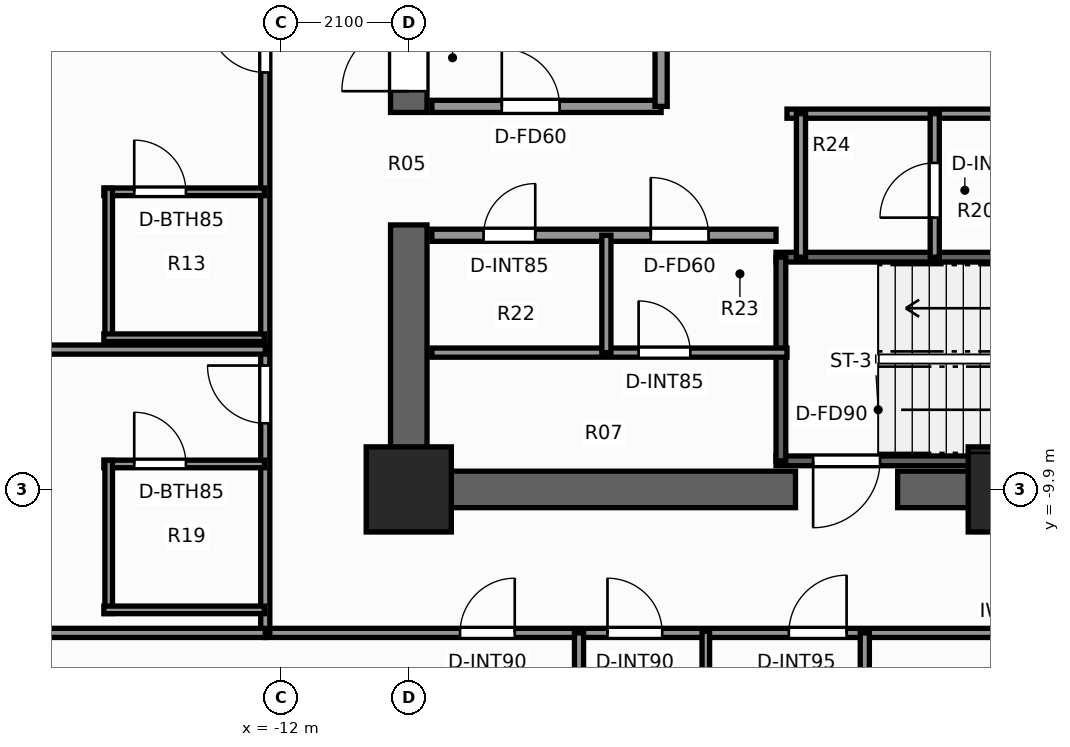
"""IFC4 building model, lengths in metres.
Left out: names, types, materials, properties, quantities, classifications, styles, units other than length and angle.
Written with IfcOpenShell. Run it as: python <this file> out.ifc"""

import sys

from ifc_helpers import new_model, si_unit, direction, frame, frame_2d, origin, origin_2d, place, context, subcontext, project, spatial, rectangle, extrude, element, fill, save


model = new_model("IFC4")
c1 = context("Model", 3, precision=1e-05, world=origin(), true_north=direction((0.0, 1.0)))
c2 = subcontext(c1, "Body", "Model", "MODEL_VIEW")
j1 = project(units=[si_unit("LENGTHUNIT", "METRE"), si_unit("PLANEANGLEUNIT", "RADIAN")], contexts=[c1])
p1 = place(None, origin())
s1 = spatial("IfcSite", under=j1, at=p1, CompositionType="ELEMENT")
p2 = place(p1, origin())
s2 = spatial("IfcBuilding", under=s1, at=p2, CompositionType="ELEMENT")
p3 = place(p2, frame((0.0, 0.0, 50.2)))
s3 = spatial("IfcBuildingStorey", under=s2, at=p3, CompositionType="ELEMENT", Elevation=50.2)
p4 = place(p3, frame((10.2, -9.9, 0.0), z_axis=(0.0, 0.0, 1.0), x_axis=(-1.0, 0.0, 0.0)))
e1 = element("IfcWall", 1, at=p4, inside=s3, PredefinedType="SHEAR", context=c2, shape_type="SweptSolid", body=[
    extrude(rectangle(XDim=12.06, YDim=0.6, at=frame_2d((6.03, 0.0))), origin(), (0.0, 0.0, 1.0), 3.3),
])
p5 = place(p3, frame((-3.54, -9.9, 0.0), z_axis=(0.0, 0.0, 1.0), x_axis=(-1.0, 0.0, 0.0)))
e2 = element("IfcWall", 2, at=p5, inside=s3, PredefinedType="SHEAR", context=c2, shape_type="SweptSolid", body=[
    extrude(rectangle(XDim=6.66, YDim=0.6, at=frame_2d((3.33, 0.0))), origin(), (0.0, 0.0, 1.0), 3.3),
])
p6 = place(p3, frame((-9.9, -9.6, 0.0), z_axis=(0.0, 0.0, 1.0), x_axis=(0.0, 1.0, 0.0)))
e3 = element("IfcWall", 3, at=p6, inside=s3, PredefinedType="SHEAR", context=c2, shape_type="SweptSolid", body=[
    extrude(rectangle(XDim=4.05, YDim=0.6, at=frame_2d((2.025, 0.0))), origin(), (0.0, 0.0, 1.0), 3.3),
])
p7 = place(p3, frame((-9.9, -3.7, 0.0), z_axis=(0.0, 0.0, 1.0), x_axis=(0.0, 1.0, 0.0)))
e4 = element("IfcWall", 4, at=p7, inside=s3, PredefinedType="SHEAR", context=c2, shape_type="SweptSolid", body=[
    extrude(rectangle(XDim=13.3, YDim=0.6, at=frame_2d((6.65, 0.0))), origin(), (0.0, 0.0, 1.0), 3.3),
])
p8 = place(p7, frame((0.35, 0.0, 0.0)))
e5 = element("IfcOpeningElement", 5, at=p8, cuts=e4, PredefinedType="OPENING", context=c2, shape_type="SweptSolid", body=[
    extrude(rectangle(XDim=1.1, YDim=2.2, at=frame_2d((0.55, 1.1))), frame((0.0, 0.31, 0.0), z_axis=(0.0, -1.0, 0.0), x_axis=(1.0, 0.0, 0.0)), (0.0, 0.0, 1.0), 0.62),
])
for number, where, z_axis, x_axis in (
    (6, (-9.9, -9.9, 0.0), (0.0, 0.0, 1.0), (1.0, 0.0, 0.0)),
    (7, (0.0, -9.9, 0.0), (0.0, 0.0, 1.0), (1.0, 0.0, 0.0)),
):
    element("IfcColumn", number, at=place(p3, frame(where, z_axis=z_axis, x_axis=x_axis)), inside=s3, PredefinedType="COLUMN", context=c2, shape_type="SweptSolid", body=[
        extrude(rectangle(XDim=1.4, YDim=1.4, at=origin_2d()), origin(), (0.0, 0.0, 1.0), 3.3),
    ])
p9 = place(p3, frame((3.86, -9.43, 0.0), z_axis=(0.0, 0.0, 1.0), x_axis=(-1.0, 0.0, 0.0)))
e8 = element("IfcWall", 8, at=p9, inside=s3, PredefinedType="SHEAR", context=c2, shape_type="SweptSolid", body=[
    extrude(rectangle(XDim=7.72, YDim=0.16, at=frame_2d((3.86, 0.0))), origin(), (0.0, 0.0, 1.0), 3.3),
])
p10 = place(p9, frame((6.01, 0.0, 0.0)))
e9 = element("IfcOpeningElement", 9, at=p10, cuts=e8, PredefinedType="OPENING", context=c2, shape_type="SweptSolid", body=[
    extrude(rectangle(XDim=1.1, YDim=2.2, at=frame_2d((0.55, 1.1))), frame((0.0, 0.09, 0.0), z_axis=(0.0, -1.0, 0.0), x_axis=(1.0, 0.0, 0.0)), (0.0, 0.0, 1.0), 0.18),
])
p11 = place(p3, frame((-3.86, -6.08, 0.0), z_axis=(0.0, 0.0, 1.0), x_axis=(1.0, 0.0, 0.0)))
e10 = element("IfcWall", 10, at=p11, inside=s3, PredefinedType="SHEAR", context=c2, shape_type="SweptSolid", body=[
    extrude(rectangle(XDim=7.72, YDim=0.16, at=frame_2d((3.86, 0.0))), origin(), (0.0, 0.0, 1.0), 3.3),
])
p12 = place(p3, frame((-3.78, -9.43, 0.0), z_axis=(0.0, 0.0, 1.0), x_axis=(0.0, 1.0, 0.0)))
e11 = element("IfcWall", 11, at=p12, inside=s3, PredefinedType="SHEAR", context=c2, shape_type="SweptSolid", body=[
    extrude(rectangle(XDim=3.35, YDim=0.16, at=frame_2d((1.675, 0.0))), origin(), (0.0, 0.0, 1.0), 3.3),
])
p13 = place(p3, frame((-9.52, -3.6, 0.0), z_axis=(0.0, 0.0, 1.0), x_axis=(1.0, 0.0, 0.0)))
e12 = element("IfcWall", 12, at=p13, inside=s3, PredefinedType="SOLIDWALL", context=c2, shape_type="SweptSolid", body=[
    extrude(rectangle(XDim=3.77, YDim=0.2, at=frame_2d((1.885, 0.0))), origin(), (0.0, 0.0, 1.0), 3.06),
])
p14 = place(p13, frame((1.15, 0.0, 0.0)))
e13 = element("IfcOpeningElement", 13, at=p14, cuts=e12, PredefinedType="OPENING", context=c2, shape_type="SweptSolid", body=[
    extrude(rectangle(XDim=0.95, YDim=2.06, at=frame_2d((0.475, 1.03))), frame((0.0, 0.11, 0.0), z_axis=(0.0, -1.0, 0.0), x_axis=(1.0, 0.0, 0.0)), (0.0, 0.0, 1.0), 0.22),
])
p15 = place(p3, frame((-5.75, -3.6, 0.0), z_axis=(0.0, 0.0, 1.0), x_axis=(0.0, 1.0, 0.0)))
e14 = element("IfcWall", 14, at=p15, inside=s3, PredefinedType="SOLIDWALL", context=c2, shape_type="SweptSolid", body=[
    extrude(rectangle(XDim=5.57, YDim=0.2, at=frame_2d((2.785, 0.0))), origin(), (0.0, 0.0, 1.0), 3.06),
])
p16 = place(p15, frame((2.75, 0.0, 0.0)))
e15 = element("IfcOpeningElement", 15, at=p16, cuts=e14, PredefinedType="OPENING", context=c2, shape_type="SweptSolid", body=[
    extrude(rectangle(XDim=1.1, YDim=2.2, at=frame_2d((0.55, 1.1))), frame((0.0, 0.11, 0.0), z_axis=(0.0, -1.0, 0.0), x_axis=(1.0, 0.0, 0.0)), (0.0, 0.0, 1.0), 0.22),
])
p17 = place(p3, frame((-9.52, -5.72, 0.0), z_axis=(0.0, 0.0, 1.0), x_axis=(1.0, 0.0, 0.0)))
e16 = element("IfcWall", 16, at=p17, inside=s3, PredefinedType="SOLIDWALL", context=c2, shape_type="SweptSolid", body=[
    extrude(rectangle(XDim=5.66, YDim=0.2, at=frame_2d((2.83, 0.0))), origin(), (0.0, 0.0, 1.0), 3.06),
])
p18 = place(p17, frame((3.6, 0.0, 0.0)))
e17 = element("IfcOpeningElement", 17, at=p18, cuts=e16, PredefinedType="OPENING", context=c2, shape_type="SweptSolid", body=[
    extrude(rectangle(XDim=0.95, YDim=2.06, at=frame_2d((0.475, 1.03))), frame((0.0, 0.11, 0.0), z_axis=(0.0, -1.0, 0.0), x_axis=(1.0, 0.0, 0.0)), (0.0, 0.0, 1.0), 0.22),
])
p19 = place(p17, frame((0.85, 0.0, 0.0)))
e18 = element("IfcOpeningElement", 18, at=p19, cuts=e16, PredefinedType="OPENING", context=c2, shape_type="SweptSolid", body=[
    extrude(rectangle(XDim=0.85, YDim=2.03, at=frame_2d((0.425, 1.015))), frame((0.0, 0.11, 0.0), z_axis=(0.0, -1.0, 0.0), x_axis=(1.0, 0.0, 0.0)), (0.0, 0.0, 1.0), 0.22),
])
p20 = place(p3, frame((-9.52, -7.65, 0.0), z_axis=(0.0, 0.0, 1.0), x_axis=(1.0, 0.0, 0.0)))
e19 = element("IfcWall", 19, at=p20, inside=s3, PredefinedType="PARTITIONING", context=c2, shape_type="SweptSolid", body=[
    extrude(rectangle(XDim=5.84, YDim=0.15, at=frame_2d((2.92, 0.0))), origin(), (0.0, 0.0, 1.0), 3.06),
])
p21 = place(p20, frame((3.4, 0.0, 0.0)))
e20 = element("IfcOpeningElement", 20, at=p21, cuts=e19, PredefinedType="OPENING", context=c2, shape_type="SweptSolid", body=[
    extrude(rectangle(XDim=0.85, YDim=2.03, at=frame_2d((0.425, 1.015))), frame((0.0, 0.085, 0.0), z_axis=(0.0, -1.0, 0.0), x_axis=(1.0, 0.0, 0.0)), (0.0, 0.0, 1.0), 0.17),
])
p22 = place(p3, frame((-6.65, -7.65, 0.0), z_axis=(0.0, 0.0, 1.0), x_axis=(0.0, 1.0, 0.0)))
e21 = element("IfcWall", 21, at=p22, inside=s3, PredefinedType="PARTITIONING", context=c2, shape_type="SweptSolid", body=[
    extrude(rectangle(XDim=1.93, YDim=0.15, at=frame_2d((0.965, 0.0))), origin(), (0.0, 0.0, 1.0), 3.06),
])
p23 = place(p3, frame((-3.68, -3.72, 0.0), z_axis=(0.0, 0.0, 1.0), x_axis=(1.0, 0.0, 0.0)))
e22 = element("IfcWall", 22, at=p23, inside=s3, PredefinedType="PARTITIONING", context=c2, shape_type="SweptSolid", body=[
    extrude(rectangle(XDim=7.36, YDim=0.15, at=frame_2d((3.68, 0.0))), origin(), (0.0, 0.0, 1.0), 3.06),
])
p24 = place(p3, frame((-3.45, -6.08, 0.0), z_axis=(0.0, 0.0, 1.0), x_axis=(0.0, 1.0, 0.0)))
e23 = element("IfcWall", 23, at=p24, inside=s3, PredefinedType="PARTITIONING", context=c2, shape_type="SweptSolid", body=[
    extrude(rectangle(XDim=2.36, YDim=0.15, at=frame_2d((1.18, 0.0))), origin(), (0.0, 0.0, 1.0), 3.06),
])
p25 = place(p3, frame((-1.25, -6.08, 0.0), z_axis=(0.0, 0.0, 1.0), x_axis=(0.0, 1.0, 0.0)))
e24 = element("IfcWall", 24, at=p25, inside=s3, PredefinedType="PARTITIONING", context=c2, shape_type="SweptSolid", body=[
    extrude(rectangle(XDim=2.36, YDim=0.15, at=frame_2d((1.18, 0.0))), origin(), (0.0, 0.0, 1.0), 3.06),
])
p26 = place(p25, frame((0.65, 0.0, 0.0)))
e25 = element("IfcOpeningElement", 25, at=p26, cuts=e24, PredefinedType="OPENING", context=c2, shape_type="SweptSolid", body=[
    extrude(rectangle(XDim=0.9, YDim=2.06, at=frame_2d((0.45, 1.03))), frame((0.0, 0.085, 0.0), z_axis=(0.0, -1.0, 0.0), x_axis=(1.0, 0.0, 0.0)), (0.0, 0.0, 1.0), 0.17),
])
p27 = place(p3, frame((-12.26, -12.26, 0.0), z_axis=(0.0, 0.0, 1.0), x_axis=(1.0, 0.0, 0.0)))
e26 = element("IfcWall", 26, at=p27, inside=s3, PredefinedType="PARTITIONING", context=c2, shape_type="SweptSolid", body=[
    extrude(rectangle(XDim=24.84, YDim=0.15, at=frame_2d((12.42, 0.0))), origin(), (0.0, 0.0, 1.0), 2.272),
])
p28 = place(p27, frame((3.203, 0.0, 0.0)))
e27 = element("IfcOpeningElement", 27, at=p28, cuts=e26, PredefinedType="OPENING", context=c2, shape_type="SweptSolid", body=[
    extrude(rectangle(XDim=0.9, YDim=2.06, at=frame_2d((0.45, 1.03))), frame((0.0, 0.085, 0.0), z_axis=(0.0, -1.0, 0.0), x_axis=(1.0, 0.0, 0.0)), (0.0, 0.0, 1.0), 0.17),
])
p29 = place(p27, frame((5.628, 0.0, 0.0)))
e28 = element("IfcOpeningElement", 28, at=p29, cuts=e26, PredefinedType="OPENING", context=c2, shape_type="SweptSolid", body=[
    extrude(rectangle(XDim=0.9, YDim=2.06, at=frame_2d((0.45, 1.03))), frame((0.0, 0.085, 0.0), z_axis=(0.0, -1.0, 0.0), x_axis=(1.0, 0.0, 0.0)), (0.0, 0.0, 1.0), 0.17),
])
p30 = place(p27, frame((8.611, 0.0, 0.0)))
e29 = element("IfcOpeningElement", 29, at=p30, cuts=e26, PredefinedType="OPENING", context=c2, shape_type="SweptSolid", body=[
    extrude(rectangle(XDim=0.95, YDim=2.06, at=frame_2d((0.475, 1.03))), frame((0.0, 0.085, 0.0), z_axis=(0.0, -1.0, 0.0), x_axis=(1.0, 0.0, 0.0)), (0.0, 0.0, 1.0), 0.17),
])
p31 = place(p27, frame((13.84, 0.0, 0.0)))
e30 = element("IfcOpeningElement", 30, at=p31, cuts=e26, PredefinedType="OPENING", context=c2, shape_type="SweptSolid", body=[
    extrude(rectangle(XDim=0.9, YDim=2.06, at=frame_2d((0.45, 1.03))), frame((0.0, 0.085, 0.0), z_axis=(0.0, -1.0, 0.0), x_axis=(1.0, 0.0, 0.0)), (0.0, 0.0, 1.0), 0.17),
])
p32 = place(p27, frame((19.542, 0.0, 0.0)))
e31 = element("IfcOpeningElement", 31, at=p32, cuts=e26, PredefinedType="OPENING", context=c2, shape_type="SweptSolid", body=[
    extrude(rectangle(XDim=0.9, YDim=2.06, at=frame_2d((0.45, 1.03))), frame((0.0, 0.085, 0.0), z_axis=(0.0, -1.0, 0.0), x_axis=(1.0, 0.0, 0.0)), (0.0, 0.0, 1.0), 0.17),
])
p33 = place(p3, frame((-12.26, -12.26, 0.0), z_axis=(0.0, 0.0, 1.0), x_axis=(0.0, 1.0, 0.0)))
e32 = element("IfcWall", 32, at=p33, inside=s3, PredefinedType="PARTITIONING", context=c2, shape_type="SweptSolid", body=[
    extrude(rectangle(XDim=24.84, YDim=0.15, at=frame_2d((12.42, 0.0))), origin(), (0.0, 0.0, 1.0), 2.272),
])
p34 = place(p33, frame((3.448, 0.0, 0.0)))
e33 = element("IfcOpeningElement", 33, at=p34, cuts=e32, PredefinedType="OPENING", context=c2, shape_type="SweptSolid", body=[
    extrude(rectangle(XDim=0.95, YDim=2.06, at=frame_2d((0.475, 1.03))), frame((0.0, 0.085, 0.0), z_axis=(0.0, -1.0, 0.0), x_axis=(1.0, 0.0, 0.0)), (0.0, 0.0, 1.0), 0.17),
])
p35 = place(p33, frame((9.218, 0.0, 0.0)))
e34 = element("IfcOpeningElement", 34, at=p35, cuts=e32, PredefinedType="OPENING", context=c2, shape_type="SweptSolid", body=[
    extrude(rectangle(XDim=0.95, YDim=2.06, at=frame_2d((0.475, 1.03))), frame((0.0, 0.085, 0.0), z_axis=(0.0, -1.0, 0.0), x_axis=(1.0, 0.0, 0.0)), (0.0, 0.0, 1.0), 0.17),
])
p36 = place(p33, frame((14.558, 0.0, 0.0)))
e35 = element("IfcOpeningElement", 35, at=p36, cuts=e32, PredefinedType="OPENING", context=c2, shape_type="SweptSolid", body=[
    extrude(rectangle(XDim=0.95, YDim=2.06, at=frame_2d((0.475, 1.03))), frame((0.0, 0.085, 0.0), z_axis=(0.0, -1.0, 0.0), x_axis=(1.0, 0.0, 0.0)), (0.0, 0.0, 1.0), 0.17),
])
p37 = place(p33, frame((20.852, 0.0, 0.0)))
e36 = element("IfcOpeningElement", 36, at=p37, cuts=e32, PredefinedType="OPENING", context=c2, shape_type="SweptSolid", body=[
    extrude(rectangle(XDim=0.95, YDim=2.06, at=frame_2d((0.475, 1.03))), frame((0.0, 0.085, 0.0), z_axis=(0.0, -1.0, 0.0), x_axis=(1.0, 0.0, 0.0)), (0.0, 0.0, 1.0), 0.17),
])
p38 = place(p3, frame((-21.98, -12.26, 0.0), z_axis=(0.0, 0.0, 1.0), x_axis=(1.0, 0.0, 0.0)))
e37 = element("IfcWall", 37, at=p38, inside=s3, PredefinedType="PARTITIONING", context=c2, shape_type="SweptSolid", body=[
    extrude(rectangle(XDim=9.72, YDim=0.15, at=frame_2d((4.86, 0.0))), origin(), (0.0, 0.0, 1.0), 2.272),
])
for number, where, z_axis, x_axis in (
    (38, (-7.1, -21.98, 0.0), (0.0, 0.0, 1.0), (0.0, 1.0, 0.0)),
    (39, (-2.4, -21.98, 0.0), (0.0, 0.0, 1.0), (0.0, 1.0, 0.0)),
):
    element("IfcWall", number, at=place(p3, frame(where, z_axis=z_axis, x_axis=x_axis)), inside=s3, PredefinedType="PARTITIONING", context=c2, shape_type="SweptSolid", body=[
        extrude(rectangle(XDim=9.72, YDim=0.15, at=frame_2d((4.86, 0.0))), origin(), (0.0, 0.0, 1.0), 2.429),
    ])
p39 = place(p3, frame((-5.015, -21.98, 0.0), z_axis=(0.0, 0.0, 1.0), x_axis=(0.0, 1.0, 0.0)))
e40 = element("IfcWall", 40, at=p39, inside=s3, PredefinedType="PARTITIONING", context=c2, shape_type="SweptSolid", body=[
    extrude(rectangle(XDim=9.745, YDim=0.125, at=frame_2d((4.873, 0.0))), origin(), (0.0, 0.0, 1.0), 2.429),
])
p40 = place(p3, frame((-21.98, -7.6, 0.0), z_axis=(0.0, 0.0, 1.0), x_axis=(1.0, 0.0, 0.0)))
e41 = element("IfcWall", 41, at=p40, inside=s3, PredefinedType="PARTITIONING", context=c2, shape_type="SweptSolid", body=[
    extrude(rectangle(XDim=9.72, YDim=0.15, at=frame_2d((4.86, 0.0))), origin(), (0.0, 0.0, 1.0), 2.429),
])
p41 = place(p3, frame((-14.915, -9.481, 0.0), z_axis=(0.0, 0.0, 1.0), x_axis=(1.0, 0.0, 0.0)))
e42 = element("IfcWall", 42, at=p41, inside=s3, PredefinedType="PARTITIONING", context=c2, shape_type="SweptSolid", body=[
    extrude(rectangle(XDim=2.64, YDim=0.125, at=frame_2d((1.32, 0.0))), origin(), (0.0, 0.0, 1.0), 3.06),
])
p42 = place(p41, frame((0.5, 0.0, 0.0)))
e43 = element("IfcOpeningElement", 43, at=p42, cuts=e42, PredefinedType="OPENING", context=c2, shape_type="SweptSolid", body=[
    extrude(rectangle(XDim=0.85, YDim=2.03, at=frame_2d((0.425, 1.015))), frame((0.0, 0.073, 0.0), z_axis=(0.0, -1.0, 0.0), x_axis=(1.0, 0.0, 0.0)), (0.0, 0.0, 1.0), 0.145),
])
p43 = place(p3, frame((-14.835, -11.941, 0.0), z_axis=(0.0, 0.0, 1.0), x_axis=(0.0, 1.0, 0.0)))
e44 = element("IfcWall", 44, at=p43, inside=s3, PredefinedType="PARTITIONING", context=c2, shape_type="SweptSolid", body=[
    extrude(rectangle(XDim=2.52, YDim=0.125, at=frame_2d((1.26, 0.0))), origin(), (0.0, 0.0, 1.0), 2.272),
])
p44 = place(p3, frame((-14.915, -11.881, 0.0), z_axis=(0.0, 0.0, 1.0), x_axis=(1.0, 0.0, 0.0)))
e45 = element("IfcWall", 45, at=p44, inside=s3, PredefinedType="PARTITIONING", context=c2, shape_type="SweptSolid", body=[
    extrude(rectangle(XDim=2.64, YDim=0.125, at=frame_2d((1.32, 0.0))), origin(), (0.0, 0.0, 1.0), 2.272),
])
p45 = place(p3, frame((-14.915, -5.005, 0.0), z_axis=(0.0, 0.0, 1.0), x_axis=(1.0, 0.0, 0.0)))
e46 = element("IfcWall", 46, at=p45, inside=s3, PredefinedType="PARTITIONING", context=c2, shape_type="SweptSolid", body=[
    extrude(rectangle(XDim=2.64, YDim=0.125, at=frame_2d((1.32, 0.0))), origin(), (0.0, 0.0, 1.0), 3.06),
])
p46 = place(p45, frame((0.5, 0.0, 0.0)))
e47 = element("IfcOpeningElement", 47, at=p46, cuts=e46, PredefinedType="OPENING", context=c2, shape_type="SweptSolid", body=[
    extrude(rectangle(XDim=0.85, YDim=2.03, at=frame_2d((0.425, 1.015))), frame((0.0, 0.073, 0.0), z_axis=(0.0, -1.0, 0.0), x_axis=(1.0, 0.0, 0.0)), (0.0, 0.0, 1.0), 0.145),
])
p47 = place(p3, frame((-14.835, -7.465, 0.0), z_axis=(0.0, 0.0, 1.0), x_axis=(0.0, 1.0, 0.0)))
e48 = element("IfcWall", 48, at=p47, inside=s3, PredefinedType="PARTITIONING", context=c2, shape_type="SweptSolid", body=[
    extrude(rectangle(XDim=2.52, YDim=0.125, at=frame_2d((1.26, 0.0))), origin(), (0.0, 0.0, 1.0), 3.06),
])
p48 = place(p3, frame((-14.915, -7.405, 0.0), z_axis=(0.0, 0.0, 1.0), x_axis=(1.0, 0.0, 0.0)))
e49 = element("IfcWall", 49, at=p48, inside=s3, PredefinedType="PARTITIONING", context=c2, shape_type="SweptSolid", body=[
    extrude(rectangle(XDim=2.64, YDim=0.125, at=frame_2d((1.32, 0.0))), origin(), (0.0, 0.0, 1.0), 3.06),
])
p49 = place(p10, origin())
e50 = element("IfcDoor", 50, at=p49, inside=s3, OperationType="SINGLE_SWING_RIGHT", PredefinedType="DOOR", context=c2, shape_type="SweptSolid", body=[
    extrude(rectangle(XDim=1.1, YDim=2.2, at=frame_2d((0.55, 1.1))), frame((0.0, 0.025, 0.0), z_axis=(0.0, -1.0, 0.0), x_axis=(1.0, 0.0, 0.0)), (0.0, 0.0, 1.0), 0.05),
])
fill(e9, e50)
p50 = place(p8, origin())
e51 = element("IfcDoor", 51, at=p50, inside=s3, OperationType="SINGLE_SWING_LEFT", PredefinedType="DOOR", context=c2, shape_type="SweptSolid", body=[
    extrude(rectangle(XDim=1.1, YDim=2.2, at=frame_2d((0.55, 1.1))), frame((0.0, 0.025, 0.0), z_axis=(0.0, -1.0, 0.0), x_axis=(1.0, 0.0, 0.0)), (0.0, 0.0, 1.0), 0.05),
])
fill(e5, e51)
p51 = place(p18, origin())
e52 = element("IfcDoor", 52, at=p51, inside=s3, OperationType="SINGLE_SWING_LEFT", PredefinedType="DOOR", context=c2, shape_type="SweptSolid", body=[
    extrude(rectangle(XDim=0.95, YDim=2.06, at=frame_2d((0.475, 1.03))), frame((0.0, 0.025, 0.0), z_axis=(0.0, -1.0, 0.0), x_axis=(1.0, 0.0, 0.0)), (0.0, 0.0, 1.0), 0.05),
])
fill(e17, e52)
p52 = place(p19, origin())
e53 = element("IfcDoor", 53, at=p52, inside=s3, OperationType="SINGLE_SWING_RIGHT", PredefinedType="DOOR", context=c2, shape_type="SweptSolid", body=[
    extrude(rectangle(XDim=0.85, YDim=2.03, at=frame_2d((0.425, 1.015))), frame((0.0, 0.025, 0.0), z_axis=(0.0, -1.0, 0.0), x_axis=(1.0, 0.0, 0.0)), (0.0, 0.0, 1.0), 0.05),
])
fill(e18, e53)
p53 = place(p21, origin())
e54 = element("IfcDoor", 54, at=p53, inside=s3, OperationType="SINGLE_SWING_LEFT", PredefinedType="DOOR", context=c2, shape_type="SweptSolid", body=[
    extrude(rectangle(XDim=0.85, YDim=2.03, at=frame_2d((0.425, 1.015))), frame((0.0, 0.025, 0.0), z_axis=(0.0, -1.0, 0.0), x_axis=(1.0, 0.0, 0.0)), (0.0, 0.0, 1.0), 0.05),
])
fill(e20, e54)
p54 = place(p14, origin())
e55 = element("IfcDoor", 55, at=p54, inside=s3, OperationType="SINGLE_SWING_LEFT", PredefinedType="DOOR", context=c2, shape_type="SweptSolid", body=[
    extrude(rectangle(XDim=0.95, YDim=2.06, at=frame_2d((0.475, 1.03))), frame((0.0, 0.025, 0.0), z_axis=(0.0, -1.0, 0.0), x_axis=(1.0, 0.0, 0.0)), (0.0, 0.0, 1.0), 0.05),
])
fill(e13, e55)
p55 = place(p26, origin())
e56 = element("IfcDoor", 56, at=p55, inside=s3, OperationType="SINGLE_SWING_LEFT", PredefinedType="DOOR", context=c2, shape_type="SweptSolid", body=[
    extrude(rectangle(XDim=0.9, YDim=2.06, at=frame_2d((0.45, 1.03))), frame((0.0, 0.025, 0.0), z_axis=(0.0, -1.0, 0.0), x_axis=(1.0, 0.0, 0.0)), (0.0, 0.0, 1.0), 0.05),
])
fill(e25, e56)
p56 = place(p28, origin())
e57 = element("IfcDoor", 57, at=p56, inside=s3, OperationType="SINGLE_SWING_RIGHT", PredefinedType="DOOR", context=c2, shape_type="SweptSolid", body=[
    extrude(rectangle(XDim=0.9, YDim=2.06, at=frame_2d((0.45, 1.03))), frame((0.0, 0.025, 0.0), z_axis=(0.0, -1.0, 0.0), x_axis=(1.0, 0.0, 0.0)), (0.0, 0.0, 1.0), 0.05),
])
fill(e27, e57)
p57 = place(p29, origin())
e58 = element("IfcDoor", 58, at=p57, inside=s3, OperationType="SINGLE_SWING_LEFT", PredefinedType="DOOR", context=c2, shape_type="SweptSolid", body=[
    extrude(rectangle(XDim=0.9, YDim=2.06, at=frame_2d((0.45, 1.03))), frame((0.0, 0.025, 0.0), z_axis=(0.0, -1.0, 0.0), x_axis=(1.0, 0.0, 0.0)), (0.0, 0.0, 1.0), 0.05),
])
fill(e28, e58)
p58 = place(p30, origin())
e59 = element("IfcDoor", 59, at=p58, inside=s3, OperationType="SINGLE_SWING_RIGHT", PredefinedType="DOOR", context=c2, shape_type="SweptSolid", body=[
    extrude(rectangle(XDim=0.95, YDim=2.06, at=frame_2d((0.475, 1.03))), frame((0.0, 0.025, 0.0), z_axis=(0.0, -1.0, 0.0), x_axis=(1.0, 0.0, 0.0)), (0.0, 0.0, 1.0), 0.05),
])
fill(e29, e59)
p59 = place(p42, origin())
e60 = element("IfcDoor", 60, at=p59, inside=s3, OperationType="SINGLE_SWING_LEFT", PredefinedType="DOOR", context=c2, shape_type="SweptSolid", body=[
    extrude(rectangle(XDim=0.85, YDim=2.03, at=frame_2d((0.425, 1.015))), frame((0.0, 0.025, 0.0), z_axis=(0.0, -1.0, 0.0), x_axis=(1.0, 0.0, 0.0)), (0.0, 0.0, 1.0), 0.05),
])
fill(e43, e60)
p60 = place(p34, origin())
e61 = element("IfcDoor", 61, at=p60, inside=s3, OperationType="SINGLE_SWING_RIGHT", PredefinedType="DOOR", context=c2, shape_type="SweptSolid", body=[
    extrude(rectangle(XDim=0.95, YDim=2.06, at=frame_2d((0.475, 1.03))), frame((0.0, 0.025, 0.0), z_axis=(0.0, -1.0, 0.0), x_axis=(1.0, 0.0, 0.0)), (0.0, 0.0, 1.0), 0.05),
])
fill(e33, e61)
p61 = place(p46, origin())
e62 = element("IfcDoor", 62, at=p61, inside=s3, OperationType="SINGLE_SWING_LEFT", PredefinedType="DOOR", context=c2, shape_type="SweptSolid", body=[
    extrude(rectangle(XDim=0.85, YDim=2.03, at=frame_2d((0.425, 1.015))), frame((0.0, 0.025, 0.0), z_axis=(0.0, -1.0, 0.0), x_axis=(1.0, 0.0, 0.0)), (0.0, 0.0, 1.0), 0.05),
])
fill(e47, e62)
p62 = place(p35, origin())
e63 = element("IfcDoor", 63, at=p62, inside=s3, OperationType="SINGLE_SWING_RIGHT", PredefinedType="DOOR", context=c2, shape_type="SweptSolid", body=[
    extrude(rectangle(XDim=0.95, YDim=2.06, at=frame_2d((0.475, 1.03))), frame((0.0, 0.025, 0.0), z_axis=(0.0, -1.0, 0.0), x_axis=(1.0, 0.0, 0.0)), (0.0, 0.0, 1.0), 0.05),
])
fill(e34, e63)
save(model, sys.argv[1])
